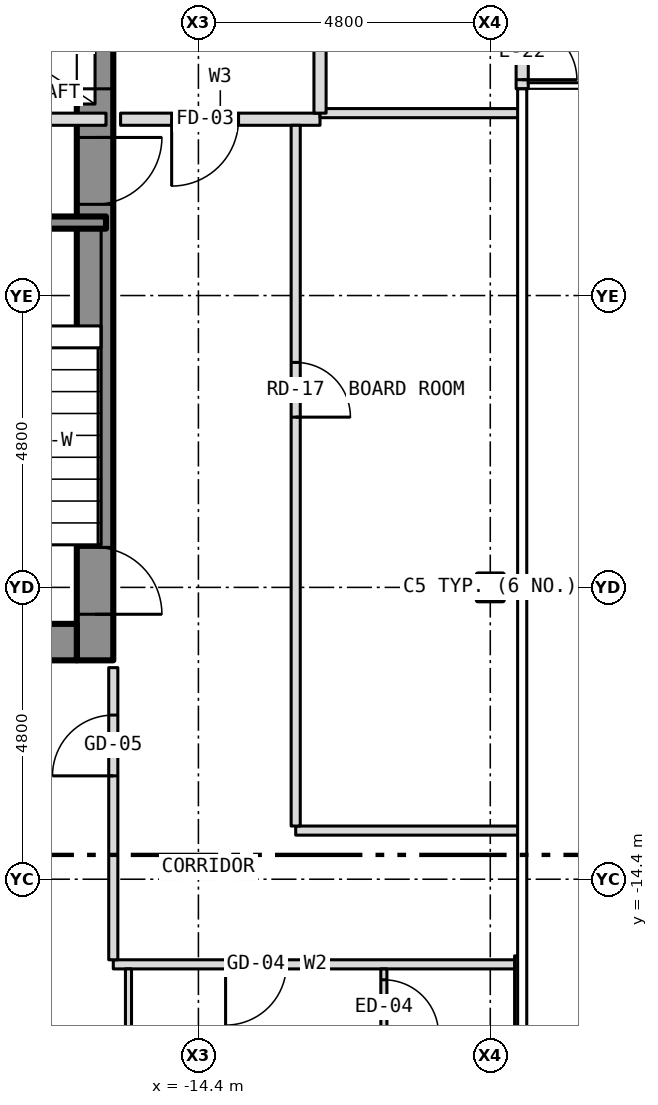
"""IFC4 building model, lengths in metres.
Left out: names, types, materials, properties, quantities, classifications, styles, units other than length and angle.
Written with IfcOpenShell. Run it as: python <this file> out.ifc"""

import sys

from ifc_helpers import new_model, si_unit, direction, frame, frame_2d, origin, origin_2d, place, context, subcontext, project, spatial, rectangle, i_section, extrude, element, fill, save


model = new_model("IFC4")
c1 = context("Model", 3, precision=1e-05, world=origin(), true_north=direction((0.0, 1.0)))
c2 = subcontext(c1, "Body", "Model", "MODEL_VIEW")
j1 = project(units=[si_unit("LENGTHUNIT", "METRE"), si_unit("PLANEANGLEUNIT", "RADIAN")], contexts=[c1])
p1 = place(None, origin())
s1 = spatial("IfcSite", under=j1, at=p1, CompositionType="ELEMENT")
p2 = place(p1, origin())
s2 = spatial("IfcBuilding", under=s1, at=p2, CompositionType="ELEMENT")
p3 = place(p2, frame((0.0, 0.0, 63.5)))
s3 = spatial("IfcBuildingStorey", under=s2, at=p3, CompositionType="ELEMENT", Elevation=63.5)
p4 = place(p3, frame((-9.6, -9.6, -0.15), z_axis=(0.0, 0.0, 1.0), x_axis=(1.0, 0.0, 0.0)))
e1 = element("IfcColumn", 1, at=p4, inside=s3, PredefinedType="COLUMN", context=c2, shape_type="SweptSolid", body=[
    extrude(i_section(OverallWidth=0.409, OverallDepth=0.424, WebThickness=0.033, FlangeThickness=0.052, at=origin_2d()), origin(), (0.0, 0.0, 1.0), 3.5),
])
p5 = place(p3, frame((-16.1, -10.8, 0.0), z_axis=(0.0, 0.0, 1.0), x_axis=(0.0, 1.0, 0.0)))
e2 = element("IfcWall", 2, at=p5, inside=s3, PredefinedType="SHEAR", context=c2, shape_type="SweptSolid", body=[
    extrude(rectangle(XDim=21.6, YDim=0.6, at=frame_2d((10.8, 0.0))), origin(), (0.0, 0.0, 1.0), 3.25),
])
p6 = place(p5, frame((9.4, 0.0, 0.0)))
e3 = element("IfcOpeningElement", 3, at=p6, cuts=e2, PredefinedType="OPENING", context=c2, shape_type="SweptSolid", body=[
    extrude(rectangle(XDim=1.1, YDim=2.1, at=frame_2d((0.55, 1.05))), frame((0.0, 0.312, 0.0), z_axis=(0.0, -1.0, 0.0), x_axis=(1.0, 0.0, 0.0)), (0.0, 0.0, 1.0), 0.624),
])
p7 = place(p5, frame((11.5, 0.0, 0.0)))
e4 = element("IfcOpeningElement", 4, at=p7, cuts=e2, PredefinedType="OPENING", context=c2, shape_type="SweptSolid", body=[
    extrude(rectangle(XDim=1.1, YDim=2.1, at=frame_2d((0.55, 1.05))), frame((0.0, 0.312, 0.0), z_axis=(0.0, -1.0, 0.0), x_axis=(1.0, 0.0, 0.0)), (0.0, 0.0, 1.0), 0.624),
])
p8 = place(p5, frame((13.6, 0.0, 0.0)))
e5 = element("IfcOpeningElement", 5, at=p8, cuts=e2, PredefinedType="OPENING", context=c2, shape_type="SweptSolid", body=[
    extrude(rectangle(XDim=1.1, YDim=2.1, at=frame_2d((0.55, 1.05))), frame((0.0, 0.312, 0.0), z_axis=(0.0, -1.0, 0.0), x_axis=(1.0, 0.0, 0.0)), (0.0, 0.0, 1.0), 0.624),
])
p9 = place(p5, frame((15.7, 0.0, 0.0)))
e6 = element("IfcOpeningElement", 6, at=p9, cuts=e2, PredefinedType="OPENING", context=c2, shape_type="SweptSolid", body=[
    extrude(rectangle(XDim=1.1, YDim=2.1, at=frame_2d((0.55, 1.05))), frame((0.0, 0.312, 0.0), z_axis=(0.0, -1.0, 0.0), x_axis=(1.0, 0.0, 0.0)), (0.0, 0.0, 1.0), 0.624),
])
p10 = place(p5, frame((17.8, 0.0, 0.0)))
e7 = element("IfcOpeningElement", 7, at=p10, cuts=e2, PredefinedType="OPENING", context=c2, shape_type="SweptSolid", body=[
    extrude(rectangle(XDim=1.1, YDim=2.1, at=frame_2d((0.55, 1.05))), frame((0.0, 0.312, 0.0), z_axis=(0.0, -1.0, 0.0), x_axis=(1.0, 0.0, 0.0)), (0.0, 0.0, 1.0), 0.624),
])
p11 = place(p5, frame((0.758, 0.0, 0.0)))
e8 = element("IfcOpeningElement", 8, at=p11, cuts=e2, PredefinedType="OPENING", context=c2, shape_type="SweptSolid", body=[
    extrude(rectangle(XDim=1.1, YDim=2.1, at=frame_2d((0.55, 1.05))), frame((0.0, 0.312, 0.0), z_axis=(0.0, -1.0, 0.0), x_axis=(1.0, 0.0, 0.0)), (0.0, 0.0, 1.0), 0.624),
])
p12 = place(p5, frame((7.5, 0.0, 0.0)))
e9 = element("IfcOpeningElement", 9, at=p12, cuts=e2, PredefinedType="OPENING", context=c2, shape_type="SweptSolid", body=[
    extrude(rectangle(XDim=1.1, YDim=2.1, at=frame_2d((0.55, 1.05))), frame((0.0, 0.312, 0.0), z_axis=(0.0, -1.0, 0.0), x_axis=(1.0, 0.0, 0.0)), (0.0, 0.0, 1.0), 0.624),
])
p13 = place(p3, frame((-23.4, -10.5, 0.0), z_axis=(0.0, 0.0, 1.0), x_axis=(1.0, 0.0, 0.0)))
e10 = element("IfcWall", 10, at=p13, inside=s3, PredefinedType="SHEAR", context=c2, shape_type="SweptSolid", body=[
    extrude(rectangle(XDim=7.0, YDim=0.6, at=frame_2d((3.5, 0.0))), origin(), (0.0, 0.0, 1.0), 3.25),
])
p14 = place(p3, frame((-9.075, -1.4, 0.0), z_axis=(0.0, 0.0, 1.0), x_axis=(0.0, 1.0, 0.0)))
e11 = element("IfcWall", 11, at=p14, inside=s3, PredefinedType="SOLIDWALL", context=c2, shape_type="SweptSolid", body=[
    extrude(rectangle(XDim=2.8, YDim=0.2, at=frame_2d((1.4, 0.0))), origin(), (0.0, 0.0, 1.0), 3.5),
])
p15 = place(p14, frame((0.15, 0.0, 0.0)))
e12 = element("IfcOpeningElement", 12, at=p15, cuts=e11, PredefinedType="OPENING", context=c2, shape_type="SweptSolid", body=[
    extrude(rectangle(XDim=0.9, YDim=2.1, at=frame_2d((0.45, 1.05))), frame((0.0, 0.112, 0.0), z_axis=(0.0, -1.0, 0.0), x_axis=(1.0, 0.0, 0.0)), (0.0, 0.0, 1.0), 0.224),
])
p16 = place(p14, frame((1.75, 0.0, 0.0)))
e13 = element("IfcOpeningElement", 13, at=p16, cuts=e11, PredefinedType="OPENING", context=c2, shape_type="SweptSolid", body=[
    extrude(rectangle(XDim=0.9, YDim=2.1, at=frame_2d((0.45, 1.05))), frame((0.0, 0.112, 0.0), z_axis=(0.0, -1.0, 0.0), x_axis=(1.0, 0.0, 0.0)), (0.0, 0.0, 1.0), 0.224),
])
p17 = place(p3, frame((-15.8, -15.8, 0.0), z_axis=(0.0, 0.0, 1.0), x_axis=(1.0, 0.0, 0.0)))
e14 = element("IfcWall", 14, at=p17, inside=s3, PredefinedType="PARTITIONING", context=c2, shape_type="SweptSolid", body=[
    extrude(rectangle(XDim=6.65, YDim=0.15, at=frame_2d((3.325, 0.0))), origin(), (0.0, 0.0, 1.0), 3.35),
])
p18 = place(p17, frame((1.847, 0.0, 0.0)))
e15 = element("IfcOpeningElement", 15, at=p18, cuts=e14, PredefinedType="OPENING", context=c2, shape_type="SweptSolid", body=[
    extrude(rectangle(XDim=1.0, YDim=2.1, at=frame_2d((0.5, 1.05))), frame((0.0, 0.087, 0.0), z_axis=(0.0, -1.0, 0.0), x_axis=(1.0, 0.0, 0.0)), (0.0, 0.0, 1.0), 0.174),
])
p19 = place(p3, frame((-12.8, -13.6, 0.0), z_axis=(0.0, 0.0, 1.0), x_axis=(1.0, 0.0, 0.0)))
e16 = element("IfcWall", 16, at=p19, inside=s3, PredefinedType="PARTITIONING", context=c2, shape_type="SweptSolid", body=[
    extrude(rectangle(XDim=3.68, YDim=0.15, at=frame_2d((1.84, 0.0))), origin(), (0.0, 0.0, 1.0), 3.35),
])
p20 = place(p3, frame((-20.0, -3.6, 0.0), z_axis=(0.0, 0.0, 1.0), x_axis=(1.0, 0.0, 0.0)))
e17 = element("IfcWall", 17, at=p20, inside=s3, PredefinedType="SHEAR", context=c2, shape_type="SweptSolid", body=[
    extrude(rectangle(XDim=4.08, YDim=0.2, at=frame_2d((2.04, 0.0))), origin(), (0.0, 0.0, 1.0), 3.25),
])
p21 = place(p3, frame((-23.88, -1.9, 0.0), z_axis=(0.0, 0.0, 1.0), x_axis=(1.0, 0.0, 0.0)))
e18 = element("IfcWall", 18, at=p21, inside=s3, PredefinedType="PARTITIONING", context=c2, shape_type="SweptSolid", body=[
    extrude(rectangle(XDim=7.96, YDim=0.2, at=frame_2d((3.98, 0.0))), origin(), (0.0, 0.0, 1.0), 3.25),
])
p22 = place(p21, frame((3.32, 0.0, 0.0)))
e19 = element("IfcOpeningElement", 19, at=p22, cuts=e18, PredefinedType="OPENING", context=c2, shape_type="SweptSolid", body=[
    extrude(rectangle(XDim=0.9, YDim=2.1, at=frame_2d((0.45, 1.05))), frame((0.0, 0.112, 0.0), z_axis=(0.0, -1.0, 0.0), x_axis=(1.0, 0.0, 0.0)), (0.0, 0.0, 1.0), 0.224),
])
p23 = place(p3, frame((-15.68, -1.9, 0.0), z_axis=(0.0, 0.0, 1.0), x_axis=(1.0, 0.0, 0.0)))
e20 = element("IfcWall", 20, at=p23, inside=s3, PredefinedType="PARTITIONING", context=c2, shape_type="SweptSolid", body=[
    extrude(rectangle(XDim=3.28, YDim=0.2, at=frame_2d((1.64, 0.0))), origin(), (0.0, 0.0, 1.0), 3.35),
])
p24 = place(p23, frame((0.84, 0.0, 0.0)))
e21 = element("IfcOpeningElement", 21, at=p24, cuts=e20, PredefinedType="OPENING", context=c2, shape_type="SweptSolid", body=[
    extrude(rectangle(XDim=1.1, YDim=2.1, at=frame_2d((0.55, 1.05))), frame((0.0, 0.112, 0.0), z_axis=(0.0, -1.0, 0.0), x_axis=(1.0, 0.0, 0.0)), (0.0, 0.0, 1.0), 0.224),
])
p25 = place(p3, frame((-12.4, -1.8, 0.0), z_axis=(0.0, 0.0, 1.0), x_axis=(1.0, 0.0, 0.0)))
e22 = element("IfcWall", 22, at=p25, inside=s3, PredefinedType="PARTITIONING", context=c2, shape_type="SweptSolid", body=[
    extrude(rectangle(XDim=3.28, YDim=0.15, at=frame_2d((1.64, 0.0))), origin(), (0.0, 0.0, 1.0), 3.35),
])
p26 = place(p3, frame((-15.8, -15.725, 0.0), z_axis=(0.0, 0.0, 1.0), x_axis=(0.0, 1.0, 0.0)))
e23 = element("IfcWall", 23, at=p26, inside=s3, PredefinedType="PARTITIONING", context=c2, shape_type="SweptSolid", body=[
    extrude(rectangle(XDim=4.805, YDim=0.15, at=frame_2d((2.403, 0.0))), origin(), (0.0, 0.0, 1.0), 3.35),
])
p27 = place(p26, frame((3.025, 0.0, 0.0)))
e24 = element("IfcOpeningElement", 24, at=p27, cuts=e23, PredefinedType="OPENING", context=c2, shape_type="SweptSolid", body=[
    extrude(rectangle(XDim=1.0, YDim=2.1, at=frame_2d((0.5, 1.05))), frame((0.0, 0.087, 0.0), z_axis=(0.0, -1.0, 0.0), x_axis=(1.0, 0.0, 0.0)), (0.0, 0.0, 1.0), 0.174),
])
p28 = place(p3, frame((-15.55, -23.88, 0.0), z_axis=(0.0, 0.0, 1.0), x_axis=(0.0, 1.0, 0.0)))
e25 = element("IfcWall", 25, at=p28, inside=s3, PredefinedType="PARTITIONING", context=c2, shape_type="SweptSolid", body=[
    extrude(rectangle(XDim=8.005, YDim=0.1, at=frame_2d((4.002, 0.0))), origin(), (0.0, 0.0, 1.0), 3.35),
])
p29 = place(p3, frame((-12.8, -13.525, 0.0), z_axis=(0.0, 0.0, 1.0), x_axis=(0.0, 1.0, 0.0)))
e26 = element("IfcWall", 26, at=p29, inside=s3, PredefinedType="PARTITIONING", context=c2, shape_type="SweptSolid", body=[
    extrude(rectangle(XDim=11.525, YDim=0.15, at=frame_2d((5.762, 0.0))), origin(), (0.0, 0.0, 1.0), 3.35),
])
p30 = place(p29, frame((6.725, 0.0, 0.0)))
e27 = element("IfcOpeningElement", 27, at=p30, cuts=e26, PredefinedType="OPENING", context=c2, shape_type="SweptSolid", body=[
    extrude(rectangle(XDim=0.9, YDim=2.1, at=frame_2d((0.45, 1.05))), frame((0.0, 0.087, 0.0), z_axis=(0.0, -1.0, 0.0), x_axis=(1.0, 0.0, 0.0)), (0.0, 0.0, 1.0), 0.174),
])
p31 = place(p3, frame((-12.4, -1.8, 0.0), z_axis=(0.0, 0.0, 1.0), x_axis=(0.0, 1.0, 0.0)))
e28 = element("IfcWall", 28, at=p31, inside=s3, PredefinedType="PARTITIONING", context=c2, shape_type="SweptSolid", body=[
    extrude(rectangle(XDim=4.0, YDim=0.2, at=frame_2d((2.0, 0.0))), origin(), (0.0, 0.0, 1.0), 3.35),
])
p32 = place(p31, frame((1.25, 0.0, 0.0)))
e29 = element("IfcOpeningElement", 29, at=p32, cuts=e28, PredefinedType="OPENING", context=c2, shape_type="SweptSolid", body=[
    extrude(rectangle(XDim=1.1, YDim=2.1, at=frame_2d((0.55, 1.05))), frame((0.0, 0.112, 0.0), z_axis=(0.0, -1.0, 0.0), x_axis=(1.0, 0.0, 0.0)), (0.0, 0.0, 1.0), 0.224),
])
p33 = place(p3, frame((-11.35, -18.95, 0.0), z_axis=(0.0, 0.0, 1.0), x_axis=(0.0, 1.0, 0.0)))
e30 = element("IfcWall", 30, at=p33, inside=s3, PredefinedType="PARTITIONING", context=c2, shape_type="SweptSolid", body=[
    extrude(rectangle(XDim=3.075, YDim=0.1, at=frame_2d((1.538, 0.0))), origin(), (0.0, 0.0, 1.0), 3.35),
])
p34 = place(p33, frame((1.996, 0.0, 0.0)))
e31 = element("IfcOpeningElement", 31, at=p34, cuts=e30, PredefinedType="OPENING", context=c2, shape_type="SweptSolid", body=[
    extrude(rectangle(XDim=0.9, YDim=2.1, at=frame_2d((0.45, 1.05))), frame((0.0, 0.062, 0.0), z_axis=(0.0, -1.0, 0.0), x_axis=(1.0, 0.0, 0.0)), (0.0, 0.0, 1.0), 0.124),
])
p35 = place(p3, frame((-9.15, -19.14, 0.0), z_axis=(0.0, 0.0, 1.0), x_axis=(0.0, 1.0, 0.0)))
e32 = element("IfcWall", 32, at=p35, inside=s3, PredefinedType="PARTITIONING", context=c2, shape_type="SweptSolid", body=[
    extrude(rectangle(XDim=3.48, YDim=0.1, at=frame_2d((1.74, 0.0))), origin(), (0.0, 0.0, 1.0), 2.733),
])
p36 = place(p15, origin())
e33 = element("IfcDoor", 33, at=p36, inside=s3, OperationType="SINGLE_SWING_LEFT", PredefinedType="DOOR", context=c2, shape_type="SweptSolid", body=[
    extrude(rectangle(XDim=0.9, YDim=2.1, at=frame_2d((0.45, 1.05))), frame((0.0, 0.025, 0.0), z_axis=(0.0, -1.0, 0.0), x_axis=(1.0, 0.0, 0.0)), (0.0, 0.0, 1.0), 0.05),
])
fill(e12, e33)
p37 = place(p6, origin())
e34 = element("IfcDoor", 34, at=p37, inside=s3, OperationType="SLIDING_TO_LEFT", PredefinedType="DOOR", context=c2, shape_type="SweptSolid", body=[
    extrude(rectangle(XDim=1.1, YDim=2.1, at=frame_2d((0.55, 1.05))), frame((0.0, 0.025, 0.0), z_axis=(0.0, -1.0, 0.0), x_axis=(1.0, 0.0, 0.0)), (0.0, 0.0, 1.0), 0.05),
])
fill(e3, e34)
p38 = place(p11, origin())
e35 = element("IfcDoor", 35, at=p38, inside=s3, OperationType="SINGLE_SWING_LEFT", PredefinedType="DOOR", context=c2, shape_type="SweptSolid", body=[
    extrude(rectangle(XDim=1.1, YDim=2.1, at=frame_2d((0.55, 1.05))), frame((0.0, 0.025, 0.0), z_axis=(0.0, -1.0, 0.0), x_axis=(1.0, 0.0, 0.0)), (0.0, 0.0, 1.0), 0.05),
])
fill(e8, e35)
p39 = place(p12, origin())
e36 = element("IfcDoor", 36, at=p39, inside=s3, OperationType="SINGLE_SWING_RIGHT", PredefinedType="DOOR", context=c2, shape_type="SweptSolid", body=[
    extrude(rectangle(XDim=1.1, YDim=2.1, at=frame_2d((0.55, 1.05))), frame((0.0, 0.025, 0.0), z_axis=(0.0, -1.0, 0.0), x_axis=(1.0, 0.0, 0.0)), (0.0, 0.0, 1.0), 0.05),
])
fill(e9, e36)
p40 = place(p24, origin())
e37 = element("IfcDoor", 37, at=p40, inside=s3, OperationType="SINGLE_SWING_LEFT", PredefinedType="DOOR", context=c2, shape_type="SweptSolid", body=[
    extrude(rectangle(XDim=1.1, YDim=2.1, at=frame_2d((0.55, 1.05))), frame((0.0, 0.025, 0.0), z_axis=(0.0, -1.0, 0.0), x_axis=(1.0, 0.0, 0.0)), (0.0, 0.0, 1.0), 0.05),
])
fill(e21, e37)
p41 = place(p18, origin())
e38 = element("IfcDoor", 38, at=p41, inside=s3, OperationType="SINGLE_SWING_LEFT", PredefinedType="DOOR", context=c2, shape_type="SweptSolid", body=[
    extrude(rectangle(XDim=1.0, YDim=2.1, at=frame_2d((0.5, 1.05))), frame((0.0, 0.025, 0.0), z_axis=(0.0, -1.0, 0.0), x_axis=(1.0, 0.0, 0.0)), (0.0, 0.0, 1.0), 0.05),
])
fill(e15, e38)
p42 = place(p34, origin())
e39 = element("IfcDoor", 39, at=p42, inside=s3, OperationType="SINGLE_SWING_LEFT", PredefinedType="DOOR", context=c2, shape_type="SweptSolid", body=[
    extrude(rectangle(XDim=0.9, YDim=2.1, at=frame_2d((0.45, 1.05))), frame((0.0, 0.025, 0.0), z_axis=(0.0, -1.0, 0.0), x_axis=(1.0, 0.0, 0.0)), (0.0, 0.0, 1.0), 0.05),
])
fill(e31, e39)
p43 = place(p27, origin())
e40 = element("IfcDoor", 40, at=p43, inside=s3, OperationType="SINGLE_SWING_LEFT", PredefinedType="DOOR", context=c2, shape_type="SweptSolid", body=[
    extrude(rectangle(XDim=1.0, YDim=2.1, at=frame_2d((0.5, 1.05))), frame((0.0, 0.025, 0.0), z_axis=(0.0, -1.0, 0.0), x_axis=(1.0, 0.0, 0.0)), (0.0, 0.0, 1.0), 0.05),
])
fill(e24, e40)
p44 = place(p30, origin())
e41 = element("IfcDoor", 41, at=p44, inside=s3, OperationType="SINGLE_SWING_LEFT", PredefinedType="DOOR", context=c2, shape_type="SweptSolid", body=[
    extrude(rectangle(XDim=0.9, YDim=2.1, at=frame_2d((0.45, 1.05))), frame((0.0, 0.025, 0.0), z_axis=(0.0, -1.0, 0.0), x_axis=(1.0, 0.0, 0.0)), (0.0, 0.0, 1.0), 0.05),
])
fill(e27, e41)
save(model, sys.argv[1])
